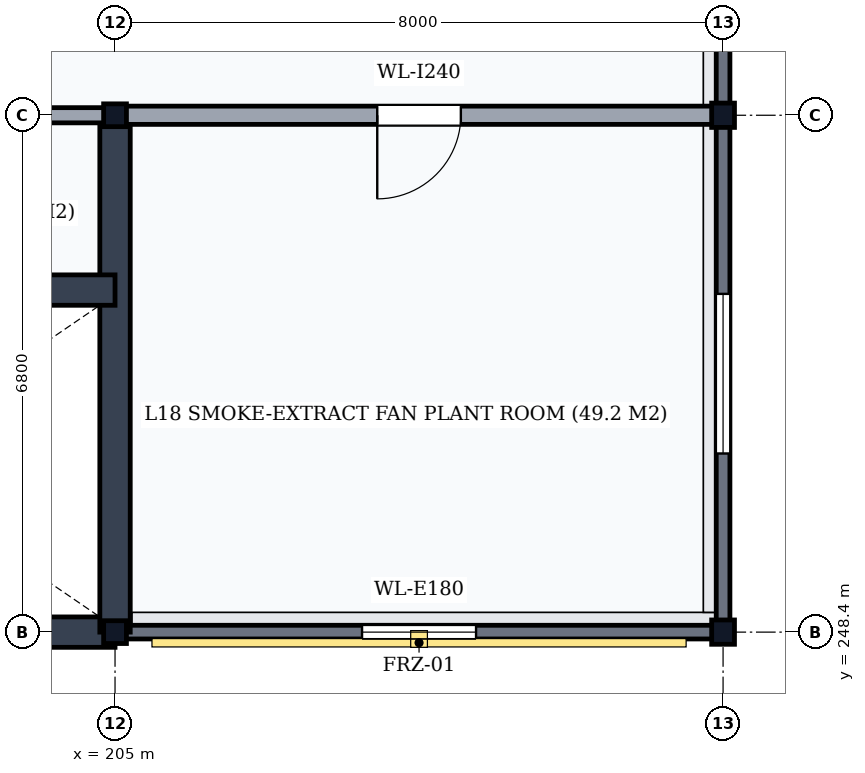
"""IFC4 building model, lengths in metres.
Left out: names, types, materials, properties, quantities, classifications, styles, units other than length and angle.
Written with IfcOpenShell. Run it as: python <this file> out.ifc"""

import sys

from ifc_helpers import new_model, si_unit, direction, frame, frame_2d, origin, origin_2d, place, context, subcontext, project, spatial, rectangle, i_section, extrude, element, fill, save


model = new_model("IFC4")
c1 = context("Model", 3, precision=1e-05, world=origin(), true_north=direction((0.0, 1.0)))
c2 = subcontext(c1, "Body", "Model", "MODEL_VIEW")
j1 = project(units=[si_unit("LENGTHUNIT", "METRE"), si_unit("PLANEANGLEUNIT", "RADIAN")], contexts=[c1])
p1 = place(None, origin())
s1 = spatial("IfcSite", under=j1, at=p1, CompositionType="ELEMENT")
p2 = place(p1, origin())
s2 = spatial("IfcBuilding", under=s1, at=p2, CompositionType="ELEMENT")
p3 = place(p2, frame((0.0, 0.0, 72.3)))
s3 = spatial("IfcBuildingStorey", under=s2, at=p3, CompositionType="ELEMENT", Elevation=72.3)
for number, where, z_axis, x_axis in (
    (1, (205.0, 248.4, 0.0), (0.0, 0.0, 1.0), (1.0, 0.0, 0.0)),
    (2, (205.0, 255.2, 0.0), (0.0, 0.0, 1.0), (1.0, 0.0, 0.0)),
):
    element("IfcColumn", number, at=place(p3, frame(where, z_axis=z_axis, x_axis=x_axis)), inside=s3, PredefinedType="COLUMN", context=c2, shape_type="SweptSolid", body=[
        extrude(i_section(OverallWidth=0.3, OverallDepth=0.3, WebThickness=0.011, FlangeThickness=0.019, FilletRadius=0.027, at=origin_2d()), origin(), (0.0, 0.0, 1.0), 5.4),
    ])
for number, where, z_axis, x_axis in (
    (3, (213.0, 248.4, 0.0), (0.0, 0.0, 1.0), (1.0, 0.0, 0.0)),
    (4, (213.0, 255.2, 0.0), (0.0, 0.0, 1.0), (1.0, 0.0, 0.0)),
):
    element("IfcColumn", number, at=place(p3, frame(where, z_axis=z_axis, x_axis=x_axis)), inside=s3, PredefinedType="COLUMN", context=c2, shape_type="SweptSolid", body=[
        extrude(i_section(OverallWidth=0.3, OverallDepth=0.32, WebThickness=0.011, FlangeThickness=0.021, FilletRadius=0.027, at=origin_2d()), origin(), (0.0, 0.0, 1.0), 5.4),
    ])
p4 = place(p3, frame((205.006, 248.4, 0.0), z_axis=(0.0, 0.0, 1.0), x_axis=(1.0, 0.0, 0.0)))
e5 = element("IfcWall", 5, at=p4, inside=s3, PredefinedType="SOLIDWALL", context=c2, shape_type="SweptSolid", body=[
    extrude(rectangle(XDim=7.988, YDim=0.18, at=frame_2d((3.994, 0.0))), origin(), (0.0, 0.0, 1.0), 4.838),
])
p5 = place(p4, frame((3.244, 0.0, 0.95)))
e6 = element("IfcOpeningElement", 6, at=p5, cuts=e5, PredefinedType="OPENING", context=c2, shape_type="SweptSolid", body=[
    extrude(rectangle(XDim=1.5, YDim=1.9, at=frame_2d((0.75, 0.95))), frame((0.0, 0.105, 0.0), z_axis=(0.0, -1.0, 0.0), x_axis=(1.0, 0.0, 0.0)), (0.0, 0.0, 1.0), 0.21),
])
p6 = place(p3, frame((213.0, 248.406, 0.0), z_axis=(0.0, 0.0, 1.0), x_axis=(0.0, 1.0, 0.0)))
e7 = element("IfcWall", 7, at=p6, inside=s3, PredefinedType="SOLIDWALL", context=c2, shape_type="SweptSolid", body=[
    extrude(rectangle(XDim=6.788, YDim=0.18, at=frame_2d((3.394, 0.0))), origin(), (0.0, 0.0, 1.0), 4.918),
])
p7 = place(p6, frame((2.344, 0.0, 0.95)))
e8 = element("IfcOpeningElement", 8, at=p7, cuts=e7, PredefinedType="OPENING", context=c2, shape_type="SweptSolid", body=[
    extrude(rectangle(XDim=2.1, YDim=2.3, at=frame_2d((1.05, 1.15))), frame((0.0, 0.105, 0.0), z_axis=(0.0, -1.0, 0.0), x_axis=(1.0, 0.0, 0.0)), (0.0, 0.0, 1.0), 0.21),
])
p8 = place(p3, frame((213.0, 255.206, 0.0), z_axis=(0.0, 0.0, 1.0), x_axis=(0.0, 1.0, 0.0)))
e9 = element("IfcWall", 9, at=p8, inside=s3, PredefinedType="SOLIDWALL", context=c2, shape_type="SweptSolid", body=[
    extrude(rectangle(XDim=7.588, YDim=0.18, at=frame_2d((3.794, 0.0))), origin(), (0.0, 0.0, 1.0), 4.878),
])
p9 = place(p3, frame((205.22, 248.53, 5.4), z_axis=(0.0, 0.0, 1.0), x_axis=(1.0, 0.0, 0.0)))
e10 = element("IfcWall", 10, at=p9, inside=s3, PredefinedType="PARAPET", context=c2, shape_type="SweptSolid", body=[
    extrude(rectangle(XDim=7.78, YDim=0.26, at=frame_2d((3.89, 0.0))), origin(), (0.0, 0.0, 1.0), 1.5),
])
p10 = place(p3, frame((212.87, 248.66, 5.4), z_axis=(0.0, 0.0, 1.0), x_axis=(0.0, 1.0, 0.0)))
e11 = element("IfcWall", 11, at=p10, inside=s3, PredefinedType="PARAPET", context=c2, shape_type="SweptSolid", body=[
    extrude(rectangle(XDim=29.08, YDim=0.26, at=frame_2d((14.54, 0.0))), origin(), (0.0, 0.0, 1.0), 1.5),
])
p11 = place(p3, frame((197.0, 248.4, 0.0), z_axis=(0.0, 0.0, 1.0), x_axis=(1.0, 0.0, 0.0)))
e12 = element("IfcWall", 12, at=p11, inside=s3, PredefinedType="SHEAR", context=c2, shape_type="SweptSolid", body=[
    extrude(rectangle(XDim=8.0, YDim=0.4, at=frame_2d((4.0, 0.0))), origin(), (0.0, 0.0, 1.0), 5.15),
])
p12 = place(p3, frame((205.0, 248.4, 0.0), z_axis=(0.0, 0.0, 1.0), x_axis=(0.0, 1.0, 0.0)))
e13 = element("IfcWall", 13, at=p12, inside=s3, PredefinedType="SHEAR", context=c2, shape_type="SweptSolid", body=[
    extrude(rectangle(XDim=6.8, YDim=0.4, at=frame_2d((3.4, 0.0))), origin(), (0.0, 0.0, 1.0), 5.15),
])
p13 = place(p3, frame((197.0, 252.9, 0.0), z_axis=(0.0, 0.0, 1.0), x_axis=(1.0, 0.0, 0.0)))
e14 = element("IfcWall", 14, at=p13, inside=s3, PredefinedType="SHEAR", context=c2, shape_type="SweptSolid", body=[
    extrude(rectangle(XDim=8.0, YDim=0.4, at=frame_2d((4.0, 0.0))), origin(), (0.0, 0.0, 1.0), 5.15),
])
p14 = place(p13, frame((0.3, 0.0, 0.0)))
e15 = element("IfcOpeningElement", 15, at=p14, cuts=e14, PredefinedType="OPENING", context=c2, shape_type="SweptSolid", body=[
    extrude(rectangle(XDim=1.15, YDim=2.15, at=frame_2d((0.575, 1.075))), frame((0.0, 0.215, 0.0), z_axis=(0.0, -1.0, 0.0), x_axis=(1.0, 0.0, 0.0)), (0.0, 0.0, 1.0), 0.43),
])
p15 = place(p3, frame((197.0, 255.2, 0.0), z_axis=(0.0, 0.0, 1.0), x_axis=(1.0, 0.0, 0.0)))
e16 = element("IfcWall", 16, at=p15, inside=s3, PredefinedType="PARTITIONING", context=c2, shape_type="SweptSolid", body=[
    extrude(rectangle(XDim=8.0, YDim=0.2, at=frame_2d((4.0, 0.0))), origin(), (0.0, 0.0, 1.0), 4.648),
])
p16 = place(p15, frame((3.275, 0.0, 0.0)))
e17 = element("IfcOpeningElement", 17, at=p16, cuts=e16, PredefinedType="OPENING", context=c2, shape_type="SweptSolid", body=[
    extrude(rectangle(XDim=1.45, YDim=2.2, at=frame_2d((0.725, 1.1))), frame((0.0, 0.115, 0.0), z_axis=(0.0, -1.0, 0.0), x_axis=(1.0, 0.0, 0.0)), (0.0, 0.0, 1.0), 0.23),
])
p17 = place(p3, frame((205.0, 255.2, 0.0), z_axis=(0.0, 0.0, 1.0), x_axis=(1.0, 0.0, 0.0)))
e18 = element("IfcWall", 18, at=p17, inside=s3, PredefinedType="PARTITIONING", context=c2, shape_type="SweptSolid", body=[
    extrude(rectangle(XDim=8.0, YDim=0.24, at=frame_2d((4.0, 0.0))), origin(), (0.0, 0.0, 1.0), 4.648),
])
p18 = place(p17, frame((3.45, 0.0, 0.0)))
e19 = element("IfcOpeningElement", 19, at=p18, cuts=e18, PredefinedType="OPENING", context=c2, shape_type="SweptSolid", body=[
    extrude(rectangle(XDim=1.1, YDim=2.1, at=frame_2d((0.55, 1.05))), frame((0.0, 0.135, 0.0), z_axis=(0.0, -1.0, 0.0), x_axis=(1.0, 0.0, 0.0)), (0.0, 0.0, 1.0), 0.27),
])
p19 = place(p5, origin())
e20 = element("IfcWindow", 20, at=p19, inside=s3, PartitioningType="SINGLE_PANEL", PredefinedType="WINDOW", context=c2, shape_type="SweptSolid", body=[
    extrude(rectangle(XDim=1.5, YDim=1.9, at=frame_2d((0.75, 0.95))), frame((0.0, 0.03, 0.0), z_axis=(0.0, -1.0, 0.0), x_axis=(1.0, 0.0, 0.0)), (0.0, 0.0, 1.0), 0.06),
])
fill(e6, e20)
p20 = place(p7, origin())
e21 = element("IfcWindow", 21, at=p20, inside=s3, PartitioningType="DOUBLE_PANEL_VERTICAL", PredefinedType="WINDOW", context=c2, shape_type="SweptSolid", body=[
    extrude(rectangle(XDim=2.1, YDim=2.3, at=frame_2d((1.05, 1.15))), frame((0.0, 0.03, 0.0), z_axis=(0.0, -1.0, 0.0), x_axis=(1.0, 0.0, 0.0)), (0.0, 0.0, 1.0), 0.06),
])
fill(e8, e21)
p21 = place(p18, frame((1.1, 0.0, 0.0), z_axis=(0.0, 0.0, 1.0), x_axis=(-1.0, 0.0, 0.0)))
e22 = element("IfcDoor", 22, at=p21, inside=s3, OperationType="SINGLE_SWING_RIGHT", PredefinedType="DOOR", context=c2, shape_type="SweptSolid", body=[
    extrude(rectangle(XDim=1.1, YDim=2.1, at=frame_2d((0.55, 1.05))), frame((0.0, 0.025, 0.0), z_axis=(0.0, -1.0, 0.0), x_axis=(1.0, 0.0, 0.0)), (0.0, 0.0, 1.0), 0.05),
])
fill(e19, e22)
save(model, sys.argv[1])
